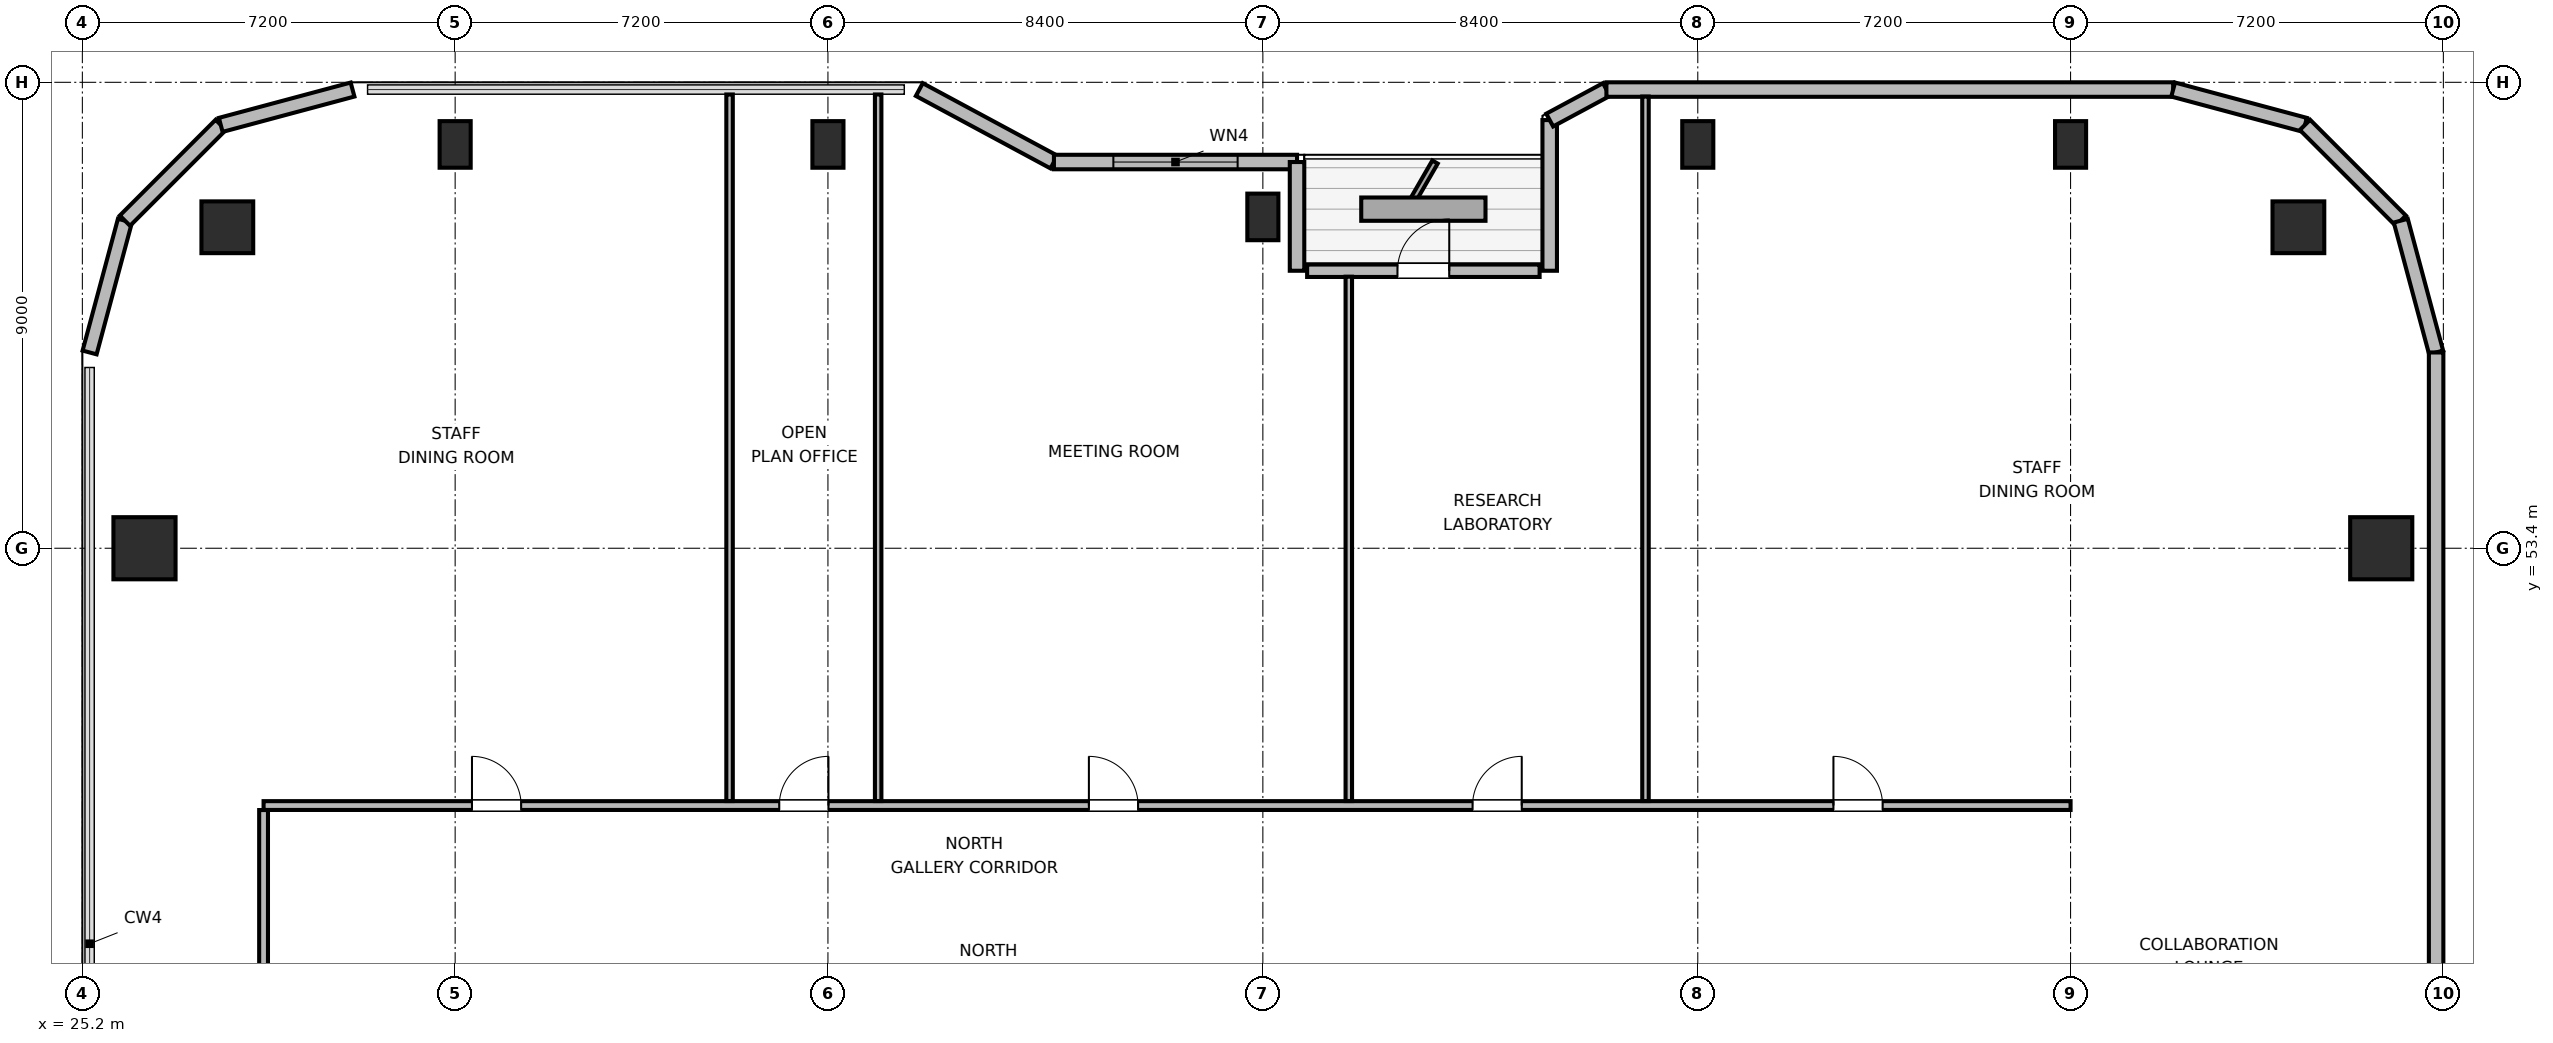
"""IFC4 building model, lengths in metres.
Left out: names, types, materials, properties, quantities, classifications, styles, units other than length and angle.
Written with IfcOpenShell. Run it as: python <this file> out.ifc"""

import sys

from ifc_helpers import new_model, si_unit, direction, frame, frame_2d, origin, origin_2d, place, context, subcontext, project, spatial, rectangle, circle, extrude, element, fill, save


model = new_model("IFC4")
c1 = context("Model", 3, precision=1e-05, world=origin(), true_north=direction((0.0, 1.0)))
c2 = subcontext(c1, "Body", "Model", "MODEL_VIEW")
j1 = project(units=[si_unit("LENGTHUNIT", "METRE"), si_unit("PLANEANGLEUNIT", "RADIAN")], contexts=[c1])
p1 = place(None, origin())
s1 = spatial("IfcSite", under=j1, at=p1, CompositionType="ELEMENT")
p2 = place(p1, origin())
s2 = spatial("IfcBuilding", under=s1, at=p2, CompositionType="ELEMENT")
p3 = place(p2, frame((0.0, 0.0, 219.3)))
s3 = spatial("IfcBuildingStorey", under=s2, at=p3, CompositionType="ELEMENT", Elevation=219.3)
for number, where, z_axis, x_axis in (
    (1, (68.0, 59.6, 0.0), (0.0, 0.0, 1.0), (1.0, 0.0, 0.0)),
    (2, (28.0, 59.6, 0.0), (0.0, 0.0, 1.0), (1.0, 0.0, 0.0)),
):
    element("IfcColumn", number, at=place(p3, frame(where, z_axis=z_axis, x_axis=x_axis)), inside=s3, PredefinedType="COLUMN", context=c2, shape_type="SweptSolid", body=[
        extrude(circle(Radius=0.5, at=origin_2d()), origin(), (0.0, 0.0, 1.0), 3.9),
    ])
for number, where, z_axis, x_axis in (
    (3, (32.4, 61.2, 0.0), (0.0, 0.0, 1.0), (1.0, 0.0, 0.0)),
    (4, (39.6, 61.2, 0.0), (0.0, 0.0, 1.0), (1.0, 0.0, 0.0)),
    (5, (48.0, 59.8, 0.0), (0.0, 0.0, 1.0), (1.0, 0.0, 0.0)),
    (6, (56.4, 61.2, 0.0), (0.0, 0.0, 1.0), (1.0, 0.0, 0.0)),
    (7, (63.6, 61.2, 0.0), (0.0, 0.0, 1.0), (1.0, 0.0, 0.0)),
):
    element("IfcColumn", number, at=place(p3, frame(where, z_axis=z_axis, x_axis=x_axis)), inside=s3, PredefinedType="COLUMN", context=c2, shape_type="SweptSolid", body=[
        extrude(rectangle(XDim=0.6, YDim=0.9, at=origin_2d()), origin(), (0.0, 0.0, 1.0), 3.9),
    ])
for number, where, z_axis, x_axis in (
    (8, (26.4, 53.4, 0.0), (0.0, 0.0, 1.0), (1.0, 0.0, 0.0)),
    (9, (69.6, 53.4, 0.0), (0.0, 0.0, 1.0), (1.0, 0.0, 0.0)),
):
    element("IfcColumn", number, at=place(p3, frame(where, z_axis=z_axis, x_axis=x_axis)), inside=s3, PredefinedType="COLUMN", context=c2, shape_type="SweptSolid", body=[
        extrude(rectangle(XDim=1.2, YDim=1.2, at=origin_2d()), origin(), (0.0, 0.0, 1.0), 3.9),
    ])
p4 = place(p3, frame((25.34, 57.182, 0.0), z_axis=(0.0, 0.0, 1.0), x_axis=(0.2588904131, 0.965906700466, 0.0)))
e10 = element("IfcWall", 10, at=p4, inside=s3, PredefinedType="SOLIDWALL", context=c2, shape_type="SweptSolid", body=[
    extrude(rectangle(XDim=2.636, YDim=0.28, at=frame_2d((1.318, 0.0))), origin(), (0.0, 0.0, 1.0), 3.68),
])
p5 = place(p3, frame((26.022, 59.728, 0.0), z_axis=(0.0, 0.0, 1.0), x_axis=(0.707153437963, 0.707060121331, 0.0)))
e11 = element("IfcWall", 11, at=p5, inside=s3, PredefinedType="SOLIDWALL", context=c2, shape_type="SweptSolid", body=[
    extrude(rectangle(XDim=2.616, YDim=0.28, at=frame_2d((1.308, 0.0))), origin(), (0.0, 0.0, 1.0), 3.68),
])
p6 = place(p3, frame((27.873, 61.577, 0.0), z_axis=(0.0, 0.0, 1.0), x_axis=(0.965883534663, 0.258976828051, 0.0)))
e12 = element("IfcWall", 12, at=p6, inside=s3, PredefinedType="SOLIDWALL", context=c2, shape_type="SweptSolid", body=[
    extrude(rectangle(XDim=2.636, YDim=0.28, at=frame_2d((1.318, 0.0))), origin(), (0.0, 0.0, 1.0), 3.68),
])
p7 = place(p3, frame((41.365, 62.26, 0.0), z_axis=(0.0, 0.0, 1.0), x_axis=(0.880473754814, -0.474094892488, 0.0)))
e13 = element("IfcWall", 13, at=p7, inside=s3, PredefinedType="SOLIDWALL", context=c2, shape_type="SweptSolid", body=[
    extrude(rectangle(XDim=2.953, YDim=0.28, at=frame_2d((1.477, 0.0))), origin(), (0.0, 0.0, 1.0), 2.265),
])
p8 = place(p3, frame((43.965, 60.86, 0.0), z_axis=(0.0, 0.0, 1.0), x_axis=(1.0, 0.0, 0.0)))
e14 = element("IfcWall", 14, at=p8, inside=s3, PredefinedType="SOLIDWALL", context=c2, shape_type="SweptSolid", body=[
    extrude(rectangle(XDim=4.695, YDim=0.28, at=frame_2d((2.348, 0.0))), origin(), (0.0, 0.0, 1.0), 2.265),
])
p9 = place(p8, frame((1.148, 0.0, 0.85)))
e15 = element("IfcOpeningElement", 15, at=p9, cuts=e14, PredefinedType="OPENING", context=c2, shape_type="SweptSolid", body=[
    extrude(rectangle(XDim=2.4, YDim=1.15, at=frame_2d((1.2, 0.575))), frame((0.0, 0.15, 0.0), z_axis=(0.0, -1.0, 0.0), x_axis=(1.0, 0.0, 0.0)), (0.0, 0.0, 1.0), 0.3),
])
p10 = place(p3, frame((48.66, 60.86, 0.0), z_axis=(0.0, 0.0, 1.0), x_axis=(0.0, -1.0, 0.0)))
e16 = element("IfcWall", 16, at=p10, inside=s3, PredefinedType="SOLIDWALL", context=c2, shape_type="SweptSolid", body=[
    extrude(rectangle(XDim=2.1, YDim=0.28, at=frame_2d((1.05, 0.0))), origin(), (0.0, 0.0, 1.0), 2.265),
])
p11 = place(p3, frame((48.855, 58.76, 0.0), z_axis=(0.0, 0.0, 1.0), x_axis=(1.0, 0.0, 0.0)))
e17 = element("IfcWall", 17, at=p11, inside=s3, PredefinedType="SOLIDWALL", context=c2, shape_type="SweptSolid", body=[
    extrude(rectangle(XDim=4.49, YDim=0.24, at=frame_2d((2.245, 0.0))), origin(), (0.0, 0.0, 1.0), 3.68),
])
p12 = place(p11, frame((1.745, 0.0, 0.0)))
e18 = element("IfcOpeningElement", 18, at=p12, cuts=e17, PredefinedType="OPENING", context=c2, shape_type="SweptSolid", body=[
    extrude(rectangle(XDim=1.0, YDim=2.02, at=frame_2d((0.5, 1.01))), frame((0.0, 0.13, 0.0), z_axis=(0.0, -1.0, 0.0), x_axis=(1.0, 0.0, 0.0)), (0.0, 0.0, 1.0), 0.26),
])
p13 = place(p3, frame((53.54, 58.76, 0.0), z_axis=(0.0, 0.0, 1.0), x_axis=(0.0, 1.0, 0.0)))
e19 = element("IfcWall", 19, at=p13, inside=s3, PredefinedType="SOLIDWALL", context=c2, shape_type="SweptSolid", body=[
    extrude(rectangle(XDim=2.91, YDim=0.28, at=frame_2d((1.455, 0.0))), origin(), (0.0, 0.0, 1.0), 2.265),
])
p14 = place(p3, frame((53.54, 61.67, 0.0), z_axis=(0.0, 0.0, 1.0), x_axis=(0.880515214249, 0.474017887296, 0.0)))
e20 = element("IfcWall", 20, at=p14, inside=s3, PredefinedType="SOLIDWALL", context=c2, shape_type="SweptSolid", body=[
    extrude(rectangle(XDim=1.244, YDim=0.28, at=frame_2d((0.622, 0.0))), origin(), (0.0, 0.0, 1.0), 3.68),
])
p15 = place(p3, frame((54.635, 62.26, 0.0), z_axis=(0.0, 0.0, 1.0), x_axis=(1.0, 0.0, 0.0)))
e21 = element("IfcWall", 21, at=p15, inside=s3, PredefinedType="SOLIDWALL", context=c2, shape_type="SweptSolid", body=[
    extrude(rectangle(XDim=10.946, YDim=0.28, at=frame_2d((5.473, 0.0))), origin(), (0.0, 0.0, 1.0), 3.68),
])
p16 = place(p3, frame((65.582, 62.26, 0.0), z_axis=(0.0, 0.0, 1.0), x_axis=(0.965883534663, -0.258976828051, 0.0)))
e22 = element("IfcWall", 22, at=p16, inside=s3, PredefinedType="SOLIDWALL", context=c2, shape_type="SweptSolid", body=[
    extrude(rectangle(XDim=2.636, YDim=0.28, at=frame_2d((1.318, 0.0))), origin(), (0.0, 0.0, 1.0), 3.68),
])
p17 = place(p3, frame((68.127, 61.577, 0.0), z_axis=(0.0, 0.0, 1.0), x_axis=(0.707153437963, -0.707060121331, 0.0)))
e23 = element("IfcWall", 23, at=p17, inside=s3, PredefinedType="SOLIDWALL", context=c2, shape_type="SweptSolid", body=[
    extrude(rectangle(XDim=2.616, YDim=0.28, at=frame_2d((1.308, 0.0))), origin(), (0.0, 0.0, 1.0), 3.68),
])
p18 = place(p3, frame((69.978, 59.728, 0.0), z_axis=(0.0, 0.0, 1.0), x_axis=(0.2588904131, -0.965906700466, 0.0)))
e24 = element("IfcWall", 24, at=p18, inside=s3, PredefinedType="SOLIDWALL", context=c2, shape_type="SweptSolid", body=[
    extrude(rectangle(XDim=2.636, YDim=0.28, at=frame_2d((1.318, 0.0))), origin(), (0.0, 0.0, 1.0), 3.68),
])
p19 = place(p3, frame((70.66, 57.182, 0.0), z_axis=(0.0, 0.0, 1.0), x_axis=(0.0, -1.0, 0.0)))
e25 = element("IfcWall", 25, at=p19, inside=s3, PredefinedType="SOLIDWALL", context=c2, shape_type="SweptSolid", body=[
    extrude(rectangle(XDim=14.442, YDim=0.28, at=frame_2d((7.221, 0.0))), origin(), (0.0, 0.0, 1.0), 3.68),
])
p20 = place(p3, frame((28.7, 48.43, 0.0), z_axis=(0.0, 0.0, 1.0), x_axis=(1.0, 0.0, 0.0)))
e26 = element("IfcWall", 26, at=p20, inside=s3, PredefinedType="PARTITIONING", context=c2, shape_type="SweptSolid", body=[
    extrude(rectangle(XDim=34.9, YDim=0.17, at=frame_2d((17.45, 0.0))), origin(), (0.0, 0.0, 1.0), 3.68),
])
p21 = place(p20, frame((4.025, 0.0, 0.0)))
e27 = element("IfcOpeningElement", 27, at=p21, cuts=e26, PredefinedType="OPENING", context=c2, shape_type="SweptSolid", body=[
    extrude(rectangle(XDim=0.95, YDim=2.04, at=frame_2d((0.475, 1.02))), frame((0.0, 0.095, 0.0), z_axis=(0.0, -1.0, 0.0), x_axis=(1.0, 0.0, 0.0)), (0.0, 0.0, 1.0), 0.19),
])
p22 = place(p20, frame((9.96, 0.0, 0.0)))
e28 = element("IfcOpeningElement", 28, at=p22, cuts=e26, PredefinedType="OPENING", context=c2, shape_type="SweptSolid", body=[
    extrude(rectangle(XDim=0.95, YDim=2.04, at=frame_2d((0.475, 1.02))), frame((0.0, 0.095, 0.0), z_axis=(0.0, -1.0, 0.0), x_axis=(1.0, 0.0, 0.0)), (0.0, 0.0, 1.0), 0.19),
])
p23 = place(p20, frame((15.94, 0.0, 0.0)))
e29 = element("IfcOpeningElement", 29, at=p23, cuts=e26, PredefinedType="OPENING", context=c2, shape_type="SweptSolid", body=[
    extrude(rectangle(XDim=0.95, YDim=2.04, at=frame_2d((0.475, 1.02))), frame((0.0, 0.095, 0.0), z_axis=(0.0, -1.0, 0.0), x_axis=(1.0, 0.0, 0.0)), (0.0, 0.0, 1.0), 0.19),
])
p24 = place(p20, frame((23.35, 0.0, 0.0)))
e30 = element("IfcOpeningElement", 30, at=p24, cuts=e26, PredefinedType="OPENING", context=c2, shape_type="SweptSolid", body=[
    extrude(rectangle(XDim=0.95, YDim=2.04, at=frame_2d((0.475, 1.02))), frame((0.0, 0.095, 0.0), z_axis=(0.0, -1.0, 0.0), x_axis=(1.0, 0.0, 0.0)), (0.0, 0.0, 1.0), 0.19),
])
p25 = place(p20, frame((30.32, 0.0, 0.0)))
e31 = element("IfcOpeningElement", 31, at=p25, cuts=e26, PredefinedType="OPENING", context=c2, shape_type="SweptSolid", body=[
    extrude(rectangle(XDim=0.95, YDim=2.04, at=frame_2d((0.475, 1.02))), frame((0.0, 0.095, 0.0), z_axis=(0.0, -1.0, 0.0), x_axis=(1.0, 0.0, 0.0)), (0.0, 0.0, 1.0), 0.19),
])
p26 = place(p3, frame((28.7, 23.657, 0.0), z_axis=(0.0, 0.0, 1.0), x_axis=(0.0, 1.0, 0.0)))
e32 = element("IfcWall", 32, at=p26, inside=s3, PredefinedType="PARTITIONING", context=c2, shape_type="SweptSolid", body=[
    extrude(rectangle(XDim=24.686, YDim=0.17, at=frame_2d((12.343, 0.0))), origin(), (0.0, 0.0, 1.0), 3.68),
])
p27 = place(p26, frame((4.353, 0.0, 0.0)))
e33 = element("IfcOpeningElement", 33, at=p27, cuts=e32, PredefinedType="OPENING", context=c2, shape_type="SweptSolid", body=[
    extrude(rectangle(XDim=0.95, YDim=2.04, at=frame_2d((0.475, 1.02))), frame((0.0, 0.095, 0.0), z_axis=(0.0, -1.0, 0.0), x_axis=(1.0, 0.0, 0.0)), (0.0, 0.0, 1.0), 0.19),
])
p28 = place(p26, frame((12.468, 0.0, 0.0)))
e34 = element("IfcOpeningElement", 34, at=p28, cuts=e32, PredefinedType="OPENING", context=c2, shape_type="SweptSolid", body=[
    extrude(rectangle(XDim=0.95, YDim=2.04, at=frame_2d((0.475, 1.02))), frame((0.0, 0.095, 0.0), z_axis=(0.0, -1.0, 0.0), x_axis=(1.0, 0.0, 0.0)), (0.0, 0.0, 1.0), 0.19),
])
p29 = place(p26, frame((19.983, 0.0, 0.0)))
e35 = element("IfcOpeningElement", 35, at=p29, cuts=e32, PredefinedType="OPENING", context=c2, shape_type="SweptSolid", body=[
    extrude(rectangle(XDim=0.95, YDim=2.04, at=frame_2d((0.475, 1.02))), frame((0.0, 0.095, 0.0), z_axis=(0.0, -1.0, 0.0), x_axis=(1.0, 0.0, 0.0)), (0.0, 0.0, 1.0), 0.19),
])
p30 = place(p3, frame((37.7, 48.517, 0.0), z_axis=(0.0, 0.0, 1.0), x_axis=(0.0, 1.0, 0.0)))
e36 = element("IfcWall", 36, at=p30, inside=s3, PredefinedType="PARTITIONING", context=c2, shape_type="SweptSolid", body=[
    extrude(rectangle(XDim=13.648, YDim=0.125, at=frame_2d((6.824, 0.0))), origin(), (0.0, 0.0, 1.0), 3.68),
])
p31 = place(p3, frame((40.57, 48.517, 0.0), z_axis=(0.0, 0.0, 1.0), x_axis=(0.0, 1.0, 0.0)))
e37 = element("IfcWall", 37, at=p31, inside=s3, PredefinedType="PARTITIONING", context=c2, shape_type="SweptSolid", body=[
    extrude(rectangle(XDim=13.648, YDim=0.125, at=frame_2d((6.824, 0.0))), origin(), (0.0, 0.0, 1.0), 3.043),
])
p32 = place(p3, frame((49.66, 48.517, 0.0), z_axis=(0.0, 0.0, 1.0), x_axis=(0.0, 1.0, 0.0)))
e38 = element("IfcWall", 38, at=p32, inside=s3, PredefinedType="PARTITIONING", context=c2, shape_type="SweptSolid", body=[
    extrude(rectangle(XDim=10.128, YDim=0.125, at=frame_2d((5.064, 0.0))), origin(), (0.0, 0.0, 1.0), 3.68),
])
p33 = place(p3, frame((55.39, 48.517, 0.0), z_axis=(0.0, 0.0, 1.0), x_axis=(0.0, 1.0, 0.0)))
e39 = element("IfcWall", 39, at=p33, inside=s3, PredefinedType="PARTITIONING", context=c2, shape_type="SweptSolid", body=[
    extrude(rectangle(XDim=13.608, YDim=0.125, at=frame_2d((6.804, 0.0))), origin(), (0.0, 0.0, 1.0), 3.043),
])
p34 = place(p9, origin())
e40 = element("IfcWindow", 40, at=p34, inside=s3, PartitioningType="SINGLE_PANEL", PredefinedType="WINDOW", context=c2, shape_type="SweptSolid", body=[
    extrude(rectangle(XDim=2.4, YDim=1.15, at=frame_2d((1.2, 0.575))), frame((0.0, 0.03, 0.0), z_axis=(0.0, -1.0, 0.0), x_axis=(1.0, 0.0, 0.0)), (0.0, 0.0, 1.0), 0.06),
])
fill(e15, e40)
p35 = place(p12, origin())
e41 = element("IfcDoor", 41, at=p35, inside=s3, OperationType="SINGLE_SWING_RIGHT", PredefinedType="DOOR", context=c2, shape_type="SweptSolid", body=[
    extrude(rectangle(XDim=1.0, YDim=2.02, at=frame_2d((0.5, 1.01))), frame((0.0, 0.025, 0.0), z_axis=(0.0, -1.0, 0.0), x_axis=(1.0, 0.0, 0.0)), (0.0, 0.0, 1.0), 0.05),
])
fill(e18, e41)
p36 = place(p21, origin())
e42 = element("IfcDoor", 42, at=p36, inside=s3, OperationType="SINGLE_SWING_LEFT", PredefinedType="DOOR", context=c2, shape_type="SweptSolid", body=[
    extrude(rectangle(XDim=0.95, YDim=2.04, at=frame_2d((0.475, 1.02))), frame((0.0, 0.025, 0.0), z_axis=(0.0, -1.0, 0.0), x_axis=(1.0, 0.0, 0.0)), (0.0, 0.0, 1.0), 0.05),
])
fill(e27, e42)
p37 = place(p22, origin())
e43 = element("IfcDoor", 43, at=p37, inside=s3, OperationType="SINGLE_SWING_RIGHT", PredefinedType="DOOR", context=c2, shape_type="SweptSolid", body=[
    extrude(rectangle(XDim=0.95, YDim=2.04, at=frame_2d((0.475, 1.02))), frame((0.0, 0.025, 0.0), z_axis=(0.0, -1.0, 0.0), x_axis=(1.0, 0.0, 0.0)), (0.0, 0.0, 1.0), 0.05),
])
fill(e28, e43)
p38 = place(p23, origin())
e44 = element("IfcDoor", 44, at=p38, inside=s3, OperationType="SINGLE_SWING_LEFT", PredefinedType="DOOR", context=c2, shape_type="SweptSolid", body=[
    extrude(rectangle(XDim=0.95, YDim=2.04, at=frame_2d((0.475, 1.02))), frame((0.0, 0.025, 0.0), z_axis=(0.0, -1.0, 0.0), x_axis=(1.0, 0.0, 0.0)), (0.0, 0.0, 1.0), 0.05),
])
fill(e29, e44)
p39 = place(p24, origin())
e45 = element("IfcDoor", 45, at=p39, inside=s3, OperationType="SINGLE_SWING_RIGHT", PredefinedType="DOOR", context=c2, shape_type="SweptSolid", body=[
    extrude(rectangle(XDim=0.95, YDim=2.04, at=frame_2d((0.475, 1.02))), frame((0.0, 0.025, 0.0), z_axis=(0.0, -1.0, 0.0), x_axis=(1.0, 0.0, 0.0)), (0.0, 0.0, 1.0), 0.05),
])
fill(e30, e45)
p40 = place(p25, origin())
e46 = element("IfcDoor", 46, at=p40, inside=s3, OperationType="SINGLE_SWING_LEFT", PredefinedType="DOOR", context=c2, shape_type="SweptSolid", body=[
    extrude(rectangle(XDim=0.95, YDim=2.04, at=frame_2d((0.475, 1.02))), frame((0.0, 0.025, 0.0), z_axis=(0.0, -1.0, 0.0), x_axis=(1.0, 0.0, 0.0)), (0.0, 0.0, 1.0), 0.05),
])
fill(e31, e46)
save(model, sys.argv[1])
